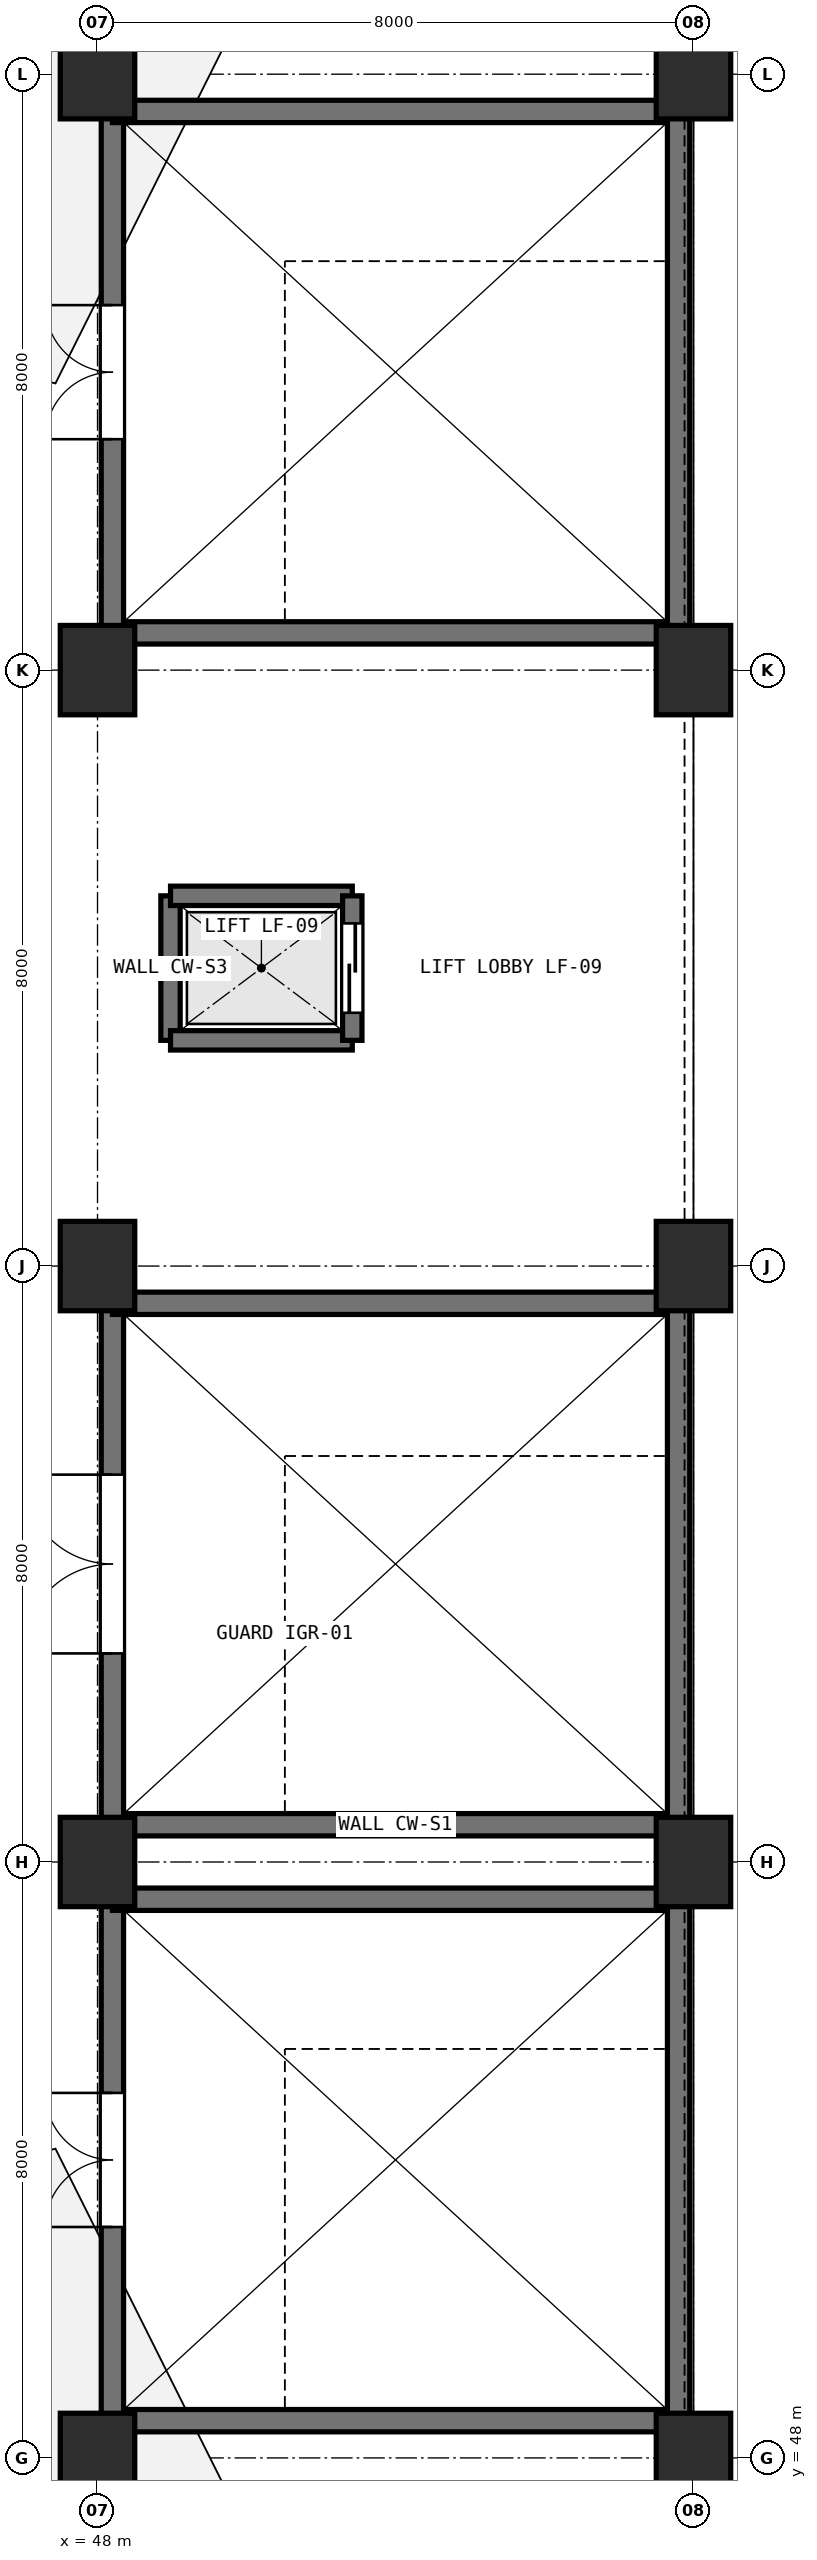
"""IFC4 building model, lengths in metres.
Left out: names, types, materials, properties, quantities, classifications, styles, units other than length and angle.
Written with IfcOpenShell. Run it as: python <this file> out.ifc"""

import sys

from ifc_helpers import new_model, si_unit, direction, frame, frame_2d, origin, origin_2d, place, context, subcontext, project, spatial, rectangle, extrude, element, fill, save


model = new_model("IFC4")
c1 = context("Model", 3, precision=1e-05, world=origin(), true_north=direction((0.0, 1.0)))
c2 = subcontext(c1, "Body", "Model", "MODEL_VIEW")
j1 = project(units=[si_unit("LENGTHUNIT", "METRE"), si_unit("PLANEANGLEUNIT", "RADIAN")], contexts=[c1])
p1 = place(None, origin())
s1 = spatial("IfcSite", under=j1, at=p1, CompositionType="ELEMENT")
p2 = place(p1, origin())
s2 = spatial("IfcBuilding", under=s1, at=p2, CompositionType="ELEMENT")
p3 = place(p2, frame((0.0, 0.0, 15.0)))
s3 = spatial("IfcBuildingStorey", under=s2, at=p3, CompositionType="ELEMENT", Elevation=15.0)
for number, where, z_axis, x_axis in (
    (1, (48.0, 48.0, 0.0), (0.0, 0.0, 1.0), (1.0, 0.0, 0.0)),
    (2, (48.0, 56.0, 0.0), (0.0, 0.0, 1.0), (1.0, 0.0, 0.0)),
    (3, (48.0, 64.0, 0.0), (0.0, 0.0, 1.0), (1.0, 0.0, 0.0)),
    (4, (48.0, 72.0, 0.0), (0.0, 0.0, 1.0), (1.0, 0.0, 0.0)),
    (5, (48.0, 80.0, 0.0), (0.0, 0.0, 1.0), (1.0, 0.0, 0.0)),
    (6, (56.0, 48.0, 0.0), (0.0, 0.0, 1.0), (1.0, 0.0, 0.0)),
    (7, (56.0, 56.0, 0.0), (0.0, 0.0, 1.0), (1.0, 0.0, 0.0)),
    (8, (56.0, 64.0, 0.0), (0.0, 0.0, 1.0), (1.0, 0.0, 0.0)),
    (9, (56.0, 72.0, 0.0), (0.0, 0.0, 1.0), (1.0, 0.0, 0.0)),
    (10, (56.0, 80.0, 0.0), (0.0, 0.0, 1.0), (1.0, 0.0, 0.0)),
):
    element("IfcColumn", number, at=place(p3, frame(where, z_axis=z_axis, x_axis=x_axis)), inside=s3, PredefinedType="COLUMN", context=c2, shape_type="SweptSolid", body=[
        extrude(rectangle(XDim=1.0, YDim=1.2, at=origin_2d()), origin(), (0.0, 0.0, 1.0), 4.8),
    ])
p4 = place(p3, frame((55.8, 56.5, 0.0), z_axis=(0.0, 0.0, 1.0), x_axis=(-1.0, 0.0, 0.0)))
e11 = element("IfcWall", 11, at=p4, inside=s3, PredefinedType="SHEAR", context=c2, shape_type="SweptSolid", body=[
    extrude(rectangle(XDim=7.6, YDim=0.3, at=frame_2d((3.8, 0.0))), origin(), (0.0, 0.0, 1.0), 4.5),
])
p5 = place(p3, frame((48.2, 56.5, 0.0), z_axis=(0.0, 0.0, 1.0), x_axis=(0.0, 1.0, 0.0)))
e12 = element("IfcWall", 12, at=p5, inside=s3, PredefinedType="SHEAR", context=c2, shape_type="SweptSolid", body=[
    extrude(rectangle(XDim=7.0, YDim=0.3, at=frame_2d((3.5, 0.0))), origin(), (0.0, 0.0, 1.0), 4.5),
])
p6 = place(p5, frame((2.3, 0.0, 0.0)))
e13 = element("IfcOpeningElement", 13, at=p6, cuts=e12, PredefinedType="OPENING", context=c2, shape_type="SweptSolid", body=[
    extrude(rectangle(XDim=2.4, YDim=2.2, at=frame_2d((1.2, 1.1))), frame((0.0, 0.16, 0.0), z_axis=(0.0, -1.0, 0.0), x_axis=(1.0, 0.0, 0.0)), (0.0, 0.0, 1.0), 0.32),
])
p7 = place(p3, frame((48.2, 63.5, 0.0), z_axis=(0.0, 0.0, 1.0), x_axis=(1.0, 0.0, 0.0)))
e14 = element("IfcWall", 14, at=p7, inside=s3, PredefinedType="SHEAR", context=c2, shape_type="SweptSolid", body=[
    extrude(rectangle(XDim=7.6, YDim=0.3, at=frame_2d((3.8, 0.0))), origin(), (0.0, 0.0, 1.0), 4.5),
])
p8 = place(p3, frame((55.8, 63.5, 0.0), z_axis=(0.0, 0.0, 1.0), x_axis=(0.0, -1.0, 0.0)))
e15 = element("IfcWall", 15, at=p8, inside=s3, PredefinedType="SHEAR", context=c2, shape_type="SweptSolid", body=[
    extrude(rectangle(XDim=7.0, YDim=0.3, at=frame_2d((3.5, 0.0))), origin(), (0.0, 0.0, 1.0), 4.5),
])
p9 = place(p3, frame((55.8, 48.5, 0.0), z_axis=(0.0, 0.0, 1.0), x_axis=(-1.0, 0.0, 0.0)))
e16 = element("IfcWall", 16, at=p9, inside=s3, PredefinedType="SHEAR", context=c2, shape_type="SweptSolid", body=[
    extrude(rectangle(XDim=7.6, YDim=0.3, at=frame_2d((3.8, 0.0))), origin(), (0.0, 0.0, 1.0), 4.5),
])
p10 = place(p3, frame((48.2, 48.5, 0.0), z_axis=(0.0, 0.0, 1.0), x_axis=(0.0, 1.0, 0.0)))
e17 = element("IfcWall", 17, at=p10, inside=s3, PredefinedType="SHEAR", context=c2, shape_type="SweptSolid", body=[
    extrude(rectangle(XDim=7.0, YDim=0.3, at=frame_2d((3.5, 0.0))), origin(), (0.0, 0.0, 1.0), 4.5),
])
p11 = place(p10, frame((2.6, 0.0, 0.0)))
e18 = element("IfcOpeningElement", 18, at=p11, cuts=e17, PredefinedType="OPENING", context=c2, shape_type="SweptSolid", body=[
    extrude(rectangle(XDim=1.8, YDim=2.2, at=frame_2d((0.9, 1.1))), frame((0.0, 0.16, 0.0), z_axis=(0.0, -1.0, 0.0), x_axis=(1.0, 0.0, 0.0)), (0.0, 0.0, 1.0), 0.32),
])
p12 = place(p3, frame((48.2, 55.5, 0.0), z_axis=(0.0, 0.0, 1.0), x_axis=(1.0, 0.0, 0.0)))
e19 = element("IfcWall", 19, at=p12, inside=s3, PredefinedType="SHEAR", context=c2, shape_type="SweptSolid", body=[
    extrude(rectangle(XDim=7.6, YDim=0.3, at=frame_2d((3.8, 0.0))), origin(), (0.0, 0.0, 1.0), 4.5),
])
p13 = place(p3, frame((55.8, 55.5, 0.0), z_axis=(0.0, 0.0, 1.0), x_axis=(0.0, -1.0, 0.0)))
e20 = element("IfcWall", 20, at=p13, inside=s3, PredefinedType="SHEAR", context=c2, shape_type="SweptSolid", body=[
    extrude(rectangle(XDim=7.0, YDim=0.3, at=frame_2d((3.5, 0.0))), origin(), (0.0, 0.0, 1.0), 4.5),
])
p14 = place(p3, frame((55.8, 72.5, 0.0), z_axis=(0.0, 0.0, 1.0), x_axis=(-1.0, 0.0, 0.0)))
e21 = element("IfcWall", 21, at=p14, inside=s3, PredefinedType="SHEAR", context=c2, shape_type="SweptSolid", body=[
    extrude(rectangle(XDim=7.6, YDim=0.3, at=frame_2d((3.8, 0.0))), origin(), (0.0, 0.0, 1.0), 4.5),
])
p15 = place(p3, frame((48.2, 72.5, 0.0), z_axis=(0.0, 0.0, 1.0), x_axis=(0.0, 1.0, 0.0)))
e22 = element("IfcWall", 22, at=p15, inside=s3, PredefinedType="SHEAR", context=c2, shape_type="SweptSolid", body=[
    extrude(rectangle(XDim=7.0, YDim=0.3, at=frame_2d((3.5, 0.0))), origin(), (0.0, 0.0, 1.0), 4.5),
])
p16 = place(p15, frame((2.6, 0.0, 0.0)))
e23 = element("IfcOpeningElement", 23, at=p16, cuts=e22, PredefinedType="OPENING", context=c2, shape_type="SweptSolid", body=[
    extrude(rectangle(XDim=1.8, YDim=2.2, at=frame_2d((0.9, 1.1))), frame((0.0, 0.16, 0.0), z_axis=(0.0, -1.0, 0.0), x_axis=(1.0, 0.0, 0.0)), (0.0, 0.0, 1.0), 0.32),
])
p17 = place(p3, frame((48.2, 79.5, 0.0), z_axis=(0.0, 0.0, 1.0), x_axis=(1.0, 0.0, 0.0)))
e24 = element("IfcWall", 24, at=p17, inside=s3, PredefinedType="SHEAR", context=c2, shape_type="SweptSolid", body=[
    extrude(rectangle(XDim=7.6, YDim=0.3, at=frame_2d((3.8, 0.0))), origin(), (0.0, 0.0, 1.0), 4.5),
])
p18 = place(p3, frame((55.8, 79.5, 0.0), z_axis=(0.0, 0.0, 1.0), x_axis=(0.0, -1.0, 0.0)))
e25 = element("IfcWall", 25, at=p18, inside=s3, PredefinedType="SHEAR", context=c2, shape_type="SweptSolid", body=[
    extrude(rectangle(XDim=7.0, YDim=0.3, at=frame_2d((3.5, 0.0))), origin(), (0.0, 0.0, 1.0), 4.5),
])
p19 = place(p3, frame((48.98, 67.03, 0.0), z_axis=(0.0, 0.0, 1.0), x_axis=(0.0, 1.0, 0.0)))
e26 = element("IfcWall", 26, at=p19, inside=s3, PredefinedType="SHEAR", context=c2, shape_type="SweptSolid", body=[
    extrude(rectangle(XDim=1.94, YDim=0.26, at=frame_2d((0.97, 0.0))), origin(), (0.0, 0.0, 1.0), 4.5),
])
for number, where, z_axis, x_axis in (
    (27, (48.98, 68.97, 0.0), (0.0, 0.0, 1.0), (1.0, 0.0, 0.0)),
    (28, (51.42, 67.03, 0.0), (0.0, 0.0, 1.0), (-1.0, 0.0, 0.0)),
):
    element("IfcWall", number, at=place(p3, frame(where, z_axis=z_axis, x_axis=x_axis)), inside=s3, PredefinedType="SHEAR", context=c2, shape_type="SweptSolid", body=[
        extrude(rectangle(XDim=2.44, YDim=0.26, at=frame_2d((1.22, 0.0))), origin(), (0.0, 0.0, 1.0), 4.5),
    ])
p20 = place(p3, frame((51.42, 68.97, 0.0), z_axis=(0.0, 0.0, 1.0), x_axis=(0.0, -1.0, 0.0)))
e29 = element("IfcWall", 29, at=p20, inside=s3, PredefinedType="SHEAR", context=c2, shape_type="SweptSolid", body=[
    extrude(rectangle(XDim=1.94, YDim=0.26, at=frame_2d((0.97, 0.0))), origin(), (0.0, 0.0, 1.0), 4.5),
])
p21 = place(p20, frame((0.37, 0.0, 0.0)))
e30 = element("IfcOpeningElement", 30, at=p21, cuts=e29, PredefinedType="OPENING", context=c2, shape_type="SweptSolid", body=[
    extrude(rectangle(XDim=1.2, YDim=2.15, at=frame_2d((0.6, 1.075))), frame((0.0, 0.14, 0.0), z_axis=(0.0, -1.0, 0.0), x_axis=(1.0, 0.0, 0.0)), (0.0, 0.0, 1.0), 0.28),
])
p22 = place(p6, frame((2.4, 0.0, 0.0), z_axis=(0.0, 0.0, 1.0), x_axis=(-1.0, 0.0, 0.0)))
e31 = element("IfcDoor", 31, at=p22, inside=s3, OperationType="DOUBLE_DOOR_SINGLE_SWING", PredefinedType="DOOR", context=c2, shape_type="SweptSolid", body=[
    extrude(rectangle(XDim=2.4, YDim=2.2, at=frame_2d((1.2, 1.1))), frame((0.0, 0.025, 0.0), z_axis=(0.0, -1.0, 0.0), x_axis=(1.0, 0.0, 0.0)), (0.0, 0.0, 1.0), 0.05),
])
fill(e13, e31)
p23 = place(p11, frame((1.8, 0.0, 0.0), z_axis=(0.0, 0.0, 1.0), x_axis=(-1.0, 0.0, 0.0)))
e32 = element("IfcDoor", 32, at=p23, inside=s3, OperationType="DOUBLE_DOOR_SINGLE_SWING", PredefinedType="DOOR", context=c2, shape_type="SweptSolid", body=[
    extrude(rectangle(XDim=1.8, YDim=2.2, at=frame_2d((0.9, 1.1))), frame((0.0, 0.025, 0.0), z_axis=(0.0, -1.0, 0.0), x_axis=(1.0, 0.0, 0.0)), (0.0, 0.0, 1.0), 0.05),
])
fill(e18, e32)
p24 = place(p16, frame((1.8, 0.0, 0.0), z_axis=(0.0, 0.0, 1.0), x_axis=(-1.0, 0.0, 0.0)))
e33 = element("IfcDoor", 33, at=p24, inside=s3, OperationType="DOUBLE_DOOR_SINGLE_SWING", PredefinedType="DOOR", context=c2, shape_type="SweptSolid", body=[
    extrude(rectangle(XDim=1.8, YDim=2.2, at=frame_2d((0.9, 1.1))), frame((0.0, 0.025, 0.0), z_axis=(0.0, -1.0, 0.0), x_axis=(1.0, 0.0, 0.0)), (0.0, 0.0, 1.0), 0.05),
])
fill(e23, e33)
p25 = place(p21, origin())
e34 = element("IfcDoor", 34, at=p25, inside=s3, OperationType="SLIDING_TO_LEFT", PredefinedType="DOOR", context=c2, shape_type="SweptSolid", body=[
    extrude(rectangle(XDim=1.2, YDim=2.15, at=frame_2d((0.6, 1.075))), frame((0.0, 0.025, 0.0), z_axis=(0.0, -1.0, 0.0), x_axis=(1.0, 0.0, 0.0)), (0.0, 0.0, 1.0), 0.05),
])
fill(e30, e34)
save(model, sys.argv[1])
